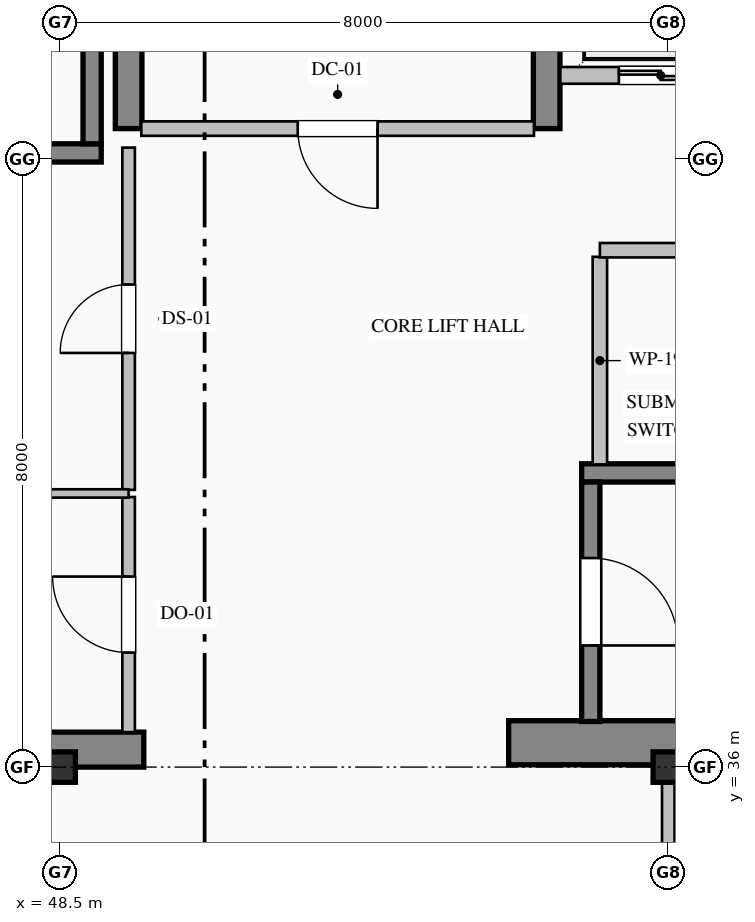
"""IFC4 building model, lengths in metres.
Left out: names, types, materials, properties, quantities, classifications, styles, units other than length and angle.
Written with IfcOpenShell. Run it as: python <this file> out.ifc"""

import sys

from ifc_helpers import new_model, si_unit, direction, frame, frame_2d, origin, origin_2d, place, context, subcontext, project, spatial, rectangle, i_section, extrude, element, fill, save


model = new_model("IFC4")
c1 = context("Model", 3, precision=1e-05, world=origin(), true_north=direction((0.0, 1.0)))
c2 = subcontext(c1, "Body", "Model", "MODEL_VIEW")
j1 = project(units=[si_unit("LENGTHUNIT", "METRE"), si_unit("PLANEANGLEUNIT", "RADIAN")], contexts=[c1])
p1 = place(None, origin())
s1 = spatial("IfcSite", under=j1, at=p1, CompositionType="ELEMENT")
p2 = place(p1, origin())
s2 = spatial("IfcBuilding", under=s1, at=p2, CompositionType="ELEMENT")
p3 = place(p2, frame((0.0, 0.0, 245.8)))
s3 = spatial("IfcBuildingStorey", under=s2, at=p3, CompositionType="ELEMENT", Elevation=245.8)
p4 = place(p3, frame((40.5, 36.23, 0.0), z_axis=(0.0, 0.0, 1.0), x_axis=(1.0, 0.0, 0.0)))
e1 = element("IfcWall", 1, at=p4, inside=s3, PredefinedType="SHEAR", context=c2, shape_type="SweptSolid", body=[
    extrude(rectangle(XDim=9.1, YDim=0.46, at=frame_2d((4.55, 0.0))), origin(), (0.0, 0.0, 1.0), 3.775),
])
p5 = place(p3, frame((54.4, 36.32, 0.0), z_axis=(0.0, 0.0, 1.0), x_axis=(1.0, 0.0, 0.0)))
e2 = element("IfcWall", 2, at=p5, inside=s3, PredefinedType="SHEAR", context=c2, shape_type="SweptSolid", body=[
    extrude(rectangle(XDim=9.6, YDim=0.58, at=frame_2d((4.8, 0.0))), origin(), (0.0, 0.0, 1.0), 4.0),
])
p6 = place(p3, frame((49.4, 44.4, 0.0), z_axis=(0.0, 0.0, 1.0), x_axis=(0.0, 1.0, 0.0)))
e3 = element("IfcWall", 3, at=p6, inside=s3, PredefinedType="SHEAR", context=c2, shape_type="SweptSolid", body=[
    extrude(rectangle(XDim=3.0, YDim=0.35, at=frame_2d((1.5, 0.0))), origin(), (0.0, 0.0, 1.0), 3.775),
])
p7 = place(p3, frame((54.9, 44.4, 0.0), z_axis=(0.0, 0.0, 1.0), x_axis=(0.0, 1.0, 0.0)))
e4 = element("IfcWall", 4, at=p7, inside=s3, PredefinedType="SHEAR", context=c2, shape_type="SweptSolid", body=[
    extrude(rectangle(XDim=7.14, YDim=0.35, at=frame_2d((3.57, 0.0))), origin(), (0.0, 0.0, 1.0), 3.775),
])
for number, where, z_axis, x_axis in (
    (5, (48.5, 36.0, 0.0), (0.0, 0.0, 1.0), (1.0, 0.0, 0.0)),
    (6, (56.5, 36.0, 0.0), (0.0, 0.0, 1.0), (1.0, 0.0, 0.0)),
):
    element("IfcColumn", number, at=place(p3, frame(where, z_axis=z_axis, x_axis=x_axis)), inside=s3, PredefinedType="COLUMN", context=c2, shape_type="SweptSolid", body=[
        extrude(i_section(OverallWidth=0.4, OverallDepth=0.4, WebThickness=0.013, FlangeThickness=0.021, FilletRadius=0.022, at=origin_2d()), origin(), (0.0, 0.0, 1.0), 4.0),
    ])
p8 = place(p3, frame((49.04, 44.08, 0.0), z_axis=(0.0, 0.0, 1.0), x_axis=(-1.0, 0.0, 0.0)))
e7 = element("IfcWall", 7, at=p8, inside=s3, PredefinedType="SOLIDWALL", context=c2, shape_type="SweptSolid", body=[
    extrude(rectangle(XDim=8.08, YDim=0.24, at=frame_2d((4.04, 0.0))), origin(), (0.0, 0.0, 1.0), 4.0),
])
p9 = place(p3, frame((48.92, 44.2, 0.0), z_axis=(0.0, 0.0, 1.0), x_axis=(0.0, 1.0, 0.0)))
e8 = element("IfcWall", 8, at=p9, inside=s3, PredefinedType="SOLIDWALL", context=c2, shape_type="SweptSolid", body=[
    extrude(rectangle(XDim=3.15, YDim=0.24, at=frame_2d((1.575, 0.0))), origin(), (0.0, 0.0, 1.0), 4.0),
])
p10 = place(p3, frame((55.36, 39.87, 0.0), z_axis=(0.0, 0.0, 1.0), x_axis=(1.0, 0.0, 0.0)))
e9 = element("IfcWall", 9, at=p10, inside=s3, PredefinedType="SOLIDWALL", context=c2, shape_type="SweptSolid", body=[
    extrude(rectangle(XDim=8.08, YDim=0.24, at=frame_2d((4.04, 0.0))), origin(), (0.0, 0.0, 1.0), 4.0),
])
p11 = place(p3, frame((55.48, 39.75, 0.0), z_axis=(0.0, 0.0, 1.0), x_axis=(0.0, -1.0, 0.0)))
e10 = element("IfcWall", 10, at=p11, inside=s3, PredefinedType="SOLIDWALL", context=c2, shape_type="SweptSolid", body=[
    extrude(rectangle(XDim=3.15, YDim=0.24, at=frame_2d((1.575, 0.0))), origin(), (0.0, 0.0, 1.0), 4.0),
])
p12 = place(p11, frame((1.0, 0.0, 0.0)))
e11 = element("IfcOpeningElement", 11, at=p12, cuts=e10, PredefinedType="OPENING", context=c2, shape_type="SweptSolid", body=[
    extrude(rectangle(XDim=1.15, YDim=2.2, at=frame_2d((0.575, 1.1))), frame((0.0, 0.13, 0.0), z_axis=(0.0, -1.0, 0.0), x_axis=(1.0, 0.0, 0.0)), (0.0, 0.0, 1.0), 0.26),
])
p13 = place(p3, frame((63.32, 45.1, 0.0), z_axis=(0.0, 0.0, 1.0), x_axis=(-1.0, 0.0, 0.0)))
e12 = element("IfcWall", 12, at=p13, inside=s3, PredefinedType="PARTITIONING", context=c2, shape_type="SweptSolid", body=[
    extrude(rectangle(XDim=8.24, YDim=0.22, at=frame_2d((4.12, 0.0))), origin(), (0.0, 0.0, 1.0), 3.775),
])
p14 = place(p13, frame((6.37, 0.0, 0.0)))
e13 = element("IfcOpeningElement", 13, at=p14, cuts=e12, PredefinedType="OPENING", context=c2, shape_type="SweptSolid", body=[
    extrude(rectangle(XDim=1.1, YDim=2.2, at=frame_2d((0.55, 1.1))), frame((0.0, 0.12, 0.0), z_axis=(0.0, -1.0, 0.0), x_axis=(1.0, 0.0, 0.0)), (0.0, 0.0, 1.0), 0.24),
])
p15 = place(p13, frame((3.57, 0.0, 0.0)))
e14 = element("IfcOpeningElement", 14, at=p15, cuts=e12, PredefinedType="OPENING", context=c2, shape_type="SweptSolid", body=[
    extrude(rectangle(XDim=1.1, YDim=2.2, at=frame_2d((0.55, 1.1))), frame((0.0, 0.12, 0.0), z_axis=(0.0, -1.0, 0.0), x_axis=(1.0, 0.0, 0.0)), (0.0, 0.0, 1.0), 0.24),
])
p16 = place(p13, frame((0.77, 0.0, 0.0)))
e15 = element("IfcOpeningElement", 15, at=p16, cuts=e12, PredefinedType="OPENING", context=c2, shape_type="SweptSolid", body=[
    extrude(rectangle(XDim=1.1, YDim=2.2, at=frame_2d((0.55, 1.1))), frame((0.0, 0.12, 0.0), z_axis=(0.0, -1.0, 0.0), x_axis=(1.0, 0.0, 0.0)), (0.0, 0.0, 1.0), 0.24),
])
p17 = place(p3, frame((54.733, 44.4, 0.0), z_axis=(0.0, 0.0, 1.0), x_axis=(-1.0, 0.0, 0.0)))
e16 = element("IfcWall", 16, at=p17, inside=s3, PredefinedType="PARTITIONING", context=c2, shape_type="SweptSolid", body=[
    extrude(rectangle(XDim=5.166, YDim=0.19, at=frame_2d((2.583, 0.0))), origin(), (0.0, 0.0, 1.0), 3.775),
])
p18 = place(p17, frame((2.058, 0.0, 0.0)))
e17 = element("IfcOpeningElement", 17, at=p18, cuts=e16, PredefinedType="OPENING", context=c2, shape_type="SweptSolid", body=[
    extrude(rectangle(XDim=1.05, YDim=2.15, at=frame_2d((0.525, 1.075))), frame((0.0, 0.105, 0.0), z_axis=(0.0, -1.0, 0.0), x_axis=(1.0, 0.0, 0.0)), (0.0, 0.0, 1.0), 0.21),
])
p19 = place(p3, frame((49.4, 36.46, 0.0), z_axis=(0.0, 0.0, 1.0), x_axis=(0.0, 1.0, 0.0)))
e18 = element("IfcWall", 18, at=p19, inside=s3, PredefinedType="PARTITIONING", context=c2, shape_type="SweptSolid", body=[
    extrude(rectangle(XDim=3.093, YDim=0.165, at=frame_2d((1.546, 0.0))), origin(), (0.0, 0.0, 1.0), 3.017),
])
p20 = place(p19, frame((1.046, 0.0, 0.0)))
e19 = element("IfcOpeningElement", 19, at=p20, cuts=e18, PredefinedType="OPENING", context=c2, shape_type="SweptSolid", body=[
    extrude(rectangle(XDim=1.0, YDim=2.15, at=frame_2d((0.5, 1.075))), frame((0.0, 0.093, 0.0), z_axis=(0.0, -1.0, 0.0), x_axis=(1.0, 0.0, 0.0)), (0.0, 0.0, 1.0), 0.185),
])
p21 = place(p3, frame((49.4, 39.647, 0.0), z_axis=(0.0, 0.0, 1.0), x_axis=(0.0, 1.0, 0.0)))
e20 = element("IfcWall", 20, at=p21, inside=s3, PredefinedType="PARTITIONING", context=c2, shape_type="SweptSolid", body=[
    extrude(rectangle(XDim=4.503, YDim=0.165, at=frame_2d((2.251, 0.0))), origin(), (0.0, 0.0, 1.0), 3.017),
])
p22 = place(p21, frame((1.802, 0.0, 0.0)))
e21 = element("IfcOpeningElement", 21, at=p22, cuts=e20, PredefinedType="OPENING", context=c2, shape_type="SweptSolid", body=[
    extrude(rectangle(XDim=0.9, YDim=2.15, at=frame_2d((0.45, 1.075))), frame((0.0, 0.093, 0.0), z_axis=(0.0, -1.0, 0.0), x_axis=(1.0, 0.0, 0.0)), (0.0, 0.0, 1.0), 0.185),
])
p23 = place(p3, frame((55.6, 42.713, 0.0), z_axis=(0.0, 0.0, 1.0), x_axis=(0.0, -1.0, 0.0)))
e22 = element("IfcWall", 22, at=p23, inside=s3, PredefinedType="PARTITIONING", context=c2, shape_type="SweptSolid", body=[
    extrude(rectangle(XDim=2.731, YDim=0.19, at=frame_2d((1.365, 0.0))), origin(), (0.0, 0.0, 1.0), 3.775),
])
p24 = place(p3, frame((40.96, 39.6, 0.0), z_axis=(0.0, 0.0, 1.0), x_axis=(1.0, 0.0, 0.0)))
e23 = element("IfcWall", 23, at=p24, inside=s3, PredefinedType="MOVABLE", context=c2, shape_type="SweptSolid", body=[
    extrude(rectangle(XDim=8.44, YDim=0.11, at=frame_2d((4.22, 0.0))), origin(), (0.0, 0.0, 1.0), 3.775),
])
p25 = place(p3, frame((60.6, 42.8, 0.0), z_axis=(0.0, 0.0, 1.0), x_axis=(-1.0, 0.0, 0.0)))
e24 = element("IfcWall", 24, at=p25, inside=s3, PredefinedType="PARTITIONING", context=c2, shape_type="SweptSolid", body=[
    extrude(rectangle(XDim=5.0, YDim=0.19, at=frame_2d((2.5, 0.0))), origin(), (0.0, 0.0, 1.0), 3.775),
])
p26 = place(p25, frame((1.8, 0.0, 0.0)))
e25 = element("IfcOpeningElement", 25, at=p26, cuts=e24, PredefinedType="OPENING", context=c2, shape_type="SweptSolid", body=[
    extrude(rectangle(XDim=1.4, YDim=2.25, at=frame_2d((0.7, 1.125))), frame((0.0, 0.105, 0.0), z_axis=(0.0, -1.0, 0.0), x_axis=(1.0, 0.0, 0.0)), (0.0, 0.0, 1.0), 0.21),
])
p27 = place(p3, frame((56.5, 36.0, 0.0), z_axis=(0.0, 0.0, 1.0), x_axis=(0.0, -1.0, 0.0)))
e26 = element("IfcWall", 26, at=p27, inside=s3, PredefinedType="PARTITIONING", context=c2, shape_type="SweptSolid", body=[
    extrude(rectangle(XDim=5.525, YDim=0.165, at=frame_2d((2.763, 0.0))), origin(), (0.0, 0.0, 1.0), 3.179),
])
p28 = place(p12, origin())
e27 = element("IfcDoor", 27, at=p28, inside=s3, OperationType="SINGLE_SWING_RIGHT", PredefinedType="DOOR", context=c2, shape_type="SweptSolid", body=[
    extrude(rectangle(XDim=1.15, YDim=2.2, at=frame_2d((0.575, 1.1))), frame((0.0, 0.025, 0.0), z_axis=(0.0, -1.0, 0.0), x_axis=(1.0, 0.0, 0.0)), (0.0, 0.0, 1.0), 0.05),
])
fill(e11, e27)
p29 = place(p14, origin())
e28 = element("IfcDoor", 28, at=p29, inside=s3, OperationType="DOUBLE_DOOR_SLIDING", PredefinedType="DOOR", context=c2, shape_type="SweptSolid", body=[
    extrude(rectangle(XDim=1.1, YDim=2.2, at=frame_2d((0.55, 1.1))), frame((0.0, 0.025, 0.0), z_axis=(0.0, -1.0, 0.0), x_axis=(1.0, 0.0, 0.0)), (0.0, 0.0, 1.0), 0.05),
])
fill(e13, e28)
p30 = place(p18, origin())
e29 = element("IfcDoor", 29, at=p30, inside=s3, OperationType="SINGLE_SWING_LEFT", PredefinedType="DOOR", context=c2, shape_type="SweptSolid", body=[
    extrude(rectangle(XDim=1.05, YDim=2.15, at=frame_2d((0.525, 1.075))), frame((0.0, 0.025, 0.0), z_axis=(0.0, -1.0, 0.0), x_axis=(1.0, 0.0, 0.0)), (0.0, 0.0, 1.0), 0.05),
])
fill(e17, e29)
p31 = place(p20, origin())
e30 = element("IfcDoor", 30, at=p31, inside=s3, OperationType="SINGLE_SWING_RIGHT", PredefinedType="DOOR", context=c2, shape_type="SweptSolid", body=[
    extrude(rectangle(XDim=1.0, YDim=2.15, at=frame_2d((0.5, 1.075))), frame((0.0, 0.025, 0.0), z_axis=(0.0, -1.0, 0.0), x_axis=(1.0, 0.0, 0.0)), (0.0, 0.0, 1.0), 0.05),
])
fill(e19, e30)
p32 = place(p22, origin())
e31 = element("IfcDoor", 31, at=p32, inside=s3, OperationType="SINGLE_SWING_LEFT", PredefinedType="DOOR", context=c2, shape_type="SweptSolid", body=[
    extrude(rectangle(XDim=0.9, YDim=2.15, at=frame_2d((0.45, 1.075))), frame((0.0, 0.025, 0.0), z_axis=(0.0, -1.0, 0.0), x_axis=(1.0, 0.0, 0.0)), (0.0, 0.0, 1.0), 0.05),
])
fill(e21, e31)
save(model, sys.argv[1])
